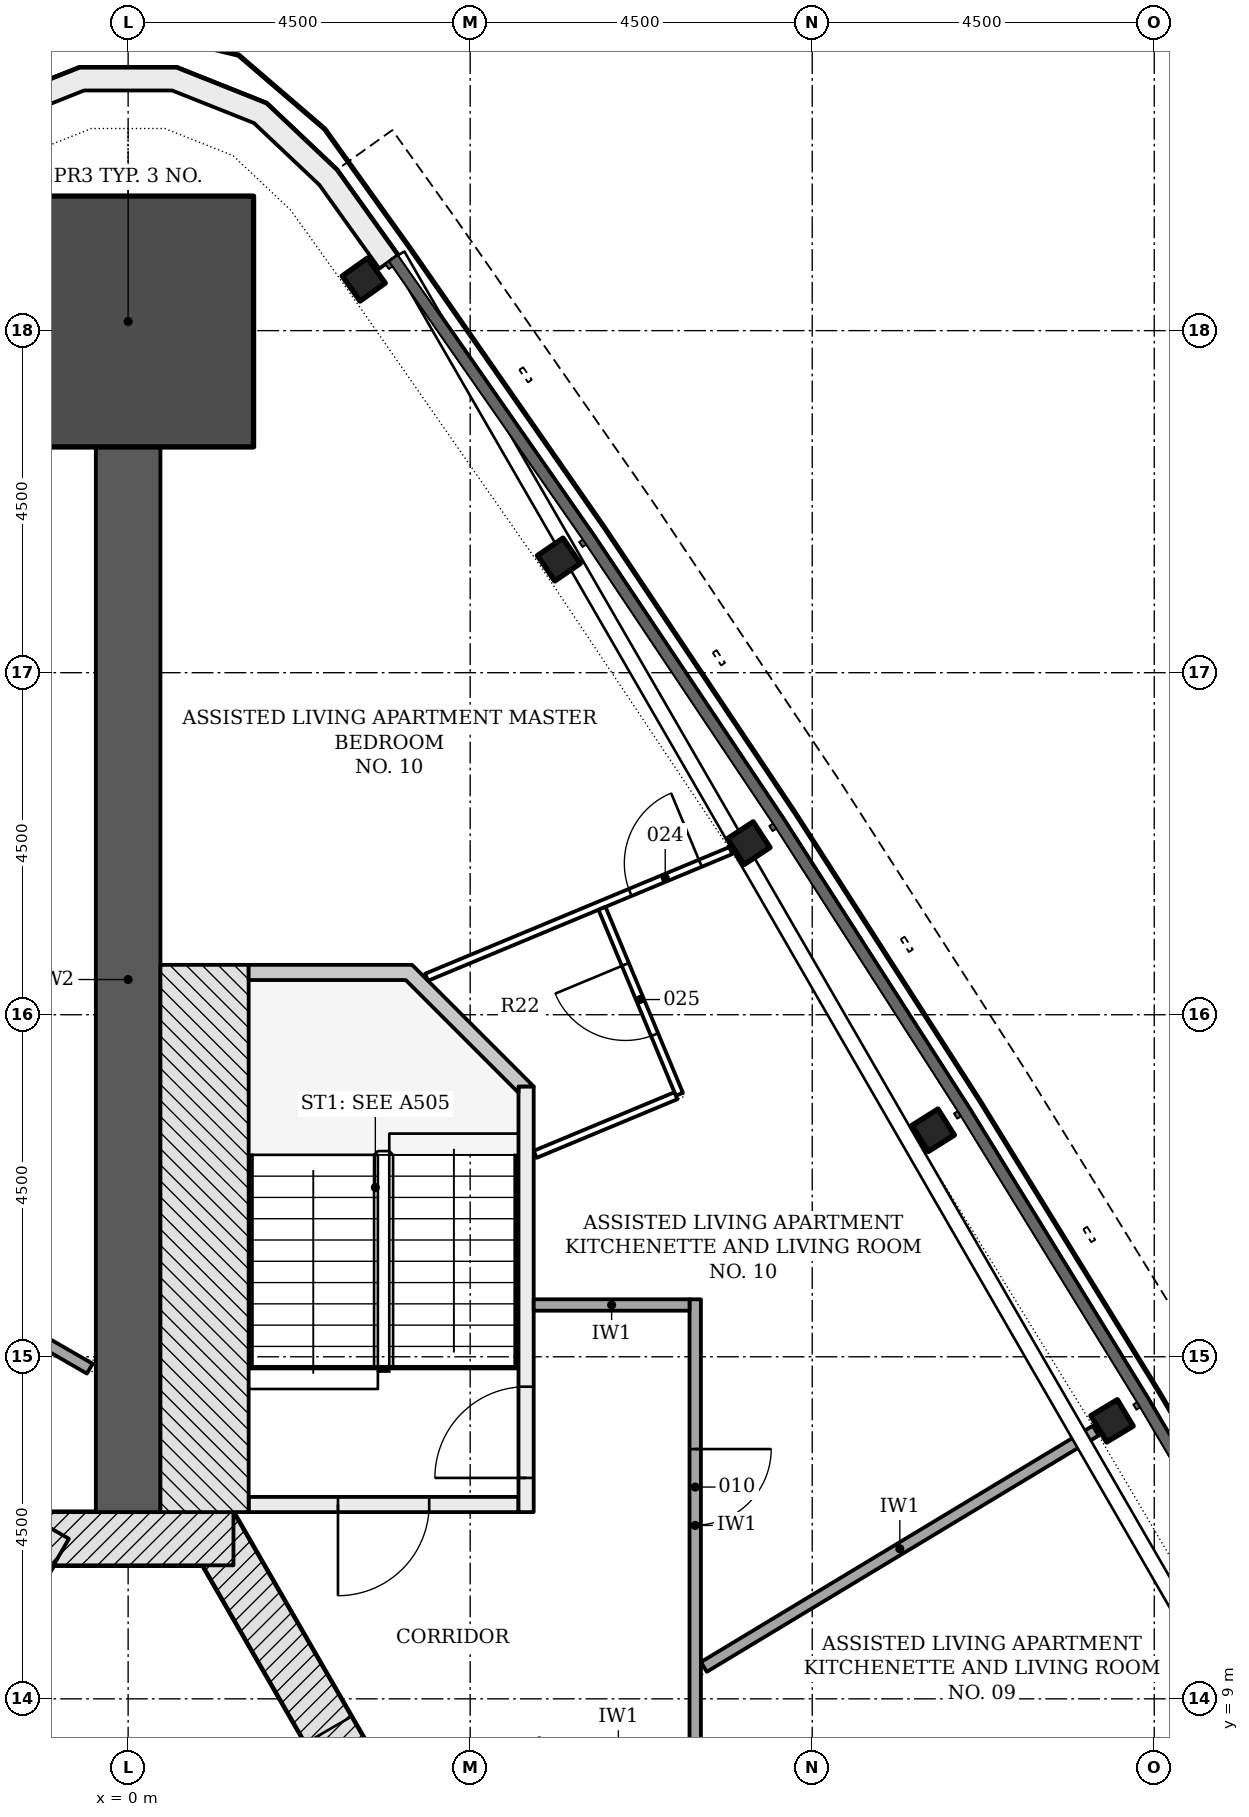
"""IFC4 building model, lengths in metres.
Left out: names, types, materials, properties, quantities, classifications, styles, units other than length and angle.
Written with IfcOpenShell. Run it as: python <this file> out.ifc"""

import sys

from ifc_helpers import new_model, si_unit, direction, frame, frame_2d, origin, origin_2d, place, context, subcontext, project, spatial, polyline, rectangle, i_section, outline, extrude, element, fill, save


model = new_model("IFC4")
c1 = context("Model", 3, precision=1e-05, world=origin(), true_north=direction((0.0, 1.0)))
c2 = subcontext(c1, "Body", "Model", "MODEL_VIEW")
j1 = project(units=[si_unit("LENGTHUNIT", "METRE"), si_unit("PLANEANGLEUNIT", "RADIAN")], contexts=[c1])
p1 = place(None, origin())
s1 = spatial("IfcSite", under=j1, at=p1, CompositionType="ELEMENT")
p2 = place(p1, origin())
s2 = spatial("IfcBuilding", under=s1, at=p2, CompositionType="ELEMENT")
p3 = place(p2, frame((0.0, 0.0, 45.6)))
s3 = spatial("IfcBuildingStorey", under=s2, at=p3, CompositionType="ELEMENT", Elevation=45.6)
p4 = place(p3, frame((10.311, -4.703, -0.2), z_axis=(0.0, 0.0, 1.0), x_axis=(-0.500001446645, 0.866024568562, 0.0)))
e1 = element("IfcWall", 1, at=p4, inside=s3, PredefinedType="SHEAR", context=c2, shape_type="SweptSolid", body=[
    extrude(rectangle(XDim=18.458, YDim=0.7, at=frame_2d((9.229, 0.0))), origin(), (0.0, 0.0, 1.0), 3.6),
])
p5 = place(p4, frame((10.5, 0.0, 0.2)))
e2 = element("IfcOpeningElement", 2, at=p5, cuts=e1, PredefinedType="OPENING", context=c2, shape_type="SweptSolid", body=[
    extrude(rectangle(XDim=1.0, YDim=2.1, at=frame_2d((0.5, 1.05))), frame((0.0, 0.36, 0.0), z_axis=(0.0, -1.0, 0.0), x_axis=(1.0, 0.0, 0.0)), (0.0, 0.0, 1.0), 0.72),
])
p6 = place(p4, frame((4.877, 0.0, 0.2)))
e3 = element("IfcOpeningElement", 3, at=p6, cuts=e1, PredefinedType="OPENING", context=c2, shape_type="SweptSolid", body=[
    extrude(rectangle(XDim=0.9, YDim=2.1, at=frame_2d((0.45, 1.05))), frame((0.0, 0.36, 0.0), z_axis=(0.0, -1.0, 0.0), x_axis=(1.0, 0.0, 0.0)), (0.0, 0.0, 1.0), 0.72),
])
p7 = place(p4, frame((14.452, 0.0, 0.2)))
e4 = element("IfcOpeningElement", 4, at=p7, cuts=e1, PredefinedType="OPENING", context=c2, shape_type="SweptSolid", body=[
    extrude(rectangle(XDim=0.9, YDim=2.1, at=frame_2d((0.45, 1.05))), frame((0.0, 0.36, 0.0), z_axis=(0.0, -1.0, 0.0), x_axis=(1.0, 0.0, 0.0)), (0.0, 0.0, 1.0), 0.72),
])
p8 = place(p3, frame((1.386, 11.106, -0.2), z_axis=(0.0, 0.0, 1.0), x_axis=(-1.0, 0.0, 0.0)))
e5 = element("IfcWall", 5, at=p8, inside=s3, PredefinedType="SHEAR", context=c2, shape_type="SweptSolid", body=[
    extrude(rectangle(XDim=2.771, YDim=0.7, at=frame_2d((1.386, 0.0))), origin(), (0.0, 0.0, 1.0), 3.6),
])
p9 = place(p3, frame((-1.083, 11.281, -0.2), z_axis=(0.0, 0.0, 1.0), x_axis=(-0.500001446645, -0.866024568562, 0.0)))
e6 = element("IfcWall", 6, at=p9, inside=s3, PredefinedType="SHEAR", context=c2, shape_type="SweptSolid", body=[
    extrude(rectangle(XDim=18.458, YDim=0.7, at=frame_2d((9.229, 0.0))), origin(), (0.0, 0.0, 1.0), 3.6),
])
p10 = place(p9, frame((8.979, 0.0, 0.2)))
e7 = element("IfcOpeningElement", 7, at=p10, cuts=e6, PredefinedType="OPENING", context=c2, shape_type="SweptSolid", body=[
    extrude(rectangle(XDim=1.2, YDim=2.1, at=frame_2d((0.6, 1.05))), frame((0.0, 0.36, 0.0), z_axis=(0.0, -1.0, 0.0), x_axis=(1.0, 0.0, 0.0)), (0.0, 0.0, 1.0), 0.72),
])
p11 = place(p9, frame((11.029, 0.0, 0.2)))
e8 = element("IfcOpeningElement", 8, at=p11, cuts=e6, PredefinedType="OPENING", context=c2, shape_type="SweptSolid", body=[
    extrude(rectangle(XDim=1.2, YDim=2.1, at=frame_2d((0.6, 1.05))), frame((0.0, 0.36, 0.0), z_axis=(0.0, -1.0, 0.0), x_axis=(1.0, 0.0, 0.0)), (0.0, 0.0, 1.0), 0.72),
])
p12 = place(p3, frame((0.0, 11.456, -0.2), z_axis=(0.0, 0.0, 1.0), x_axis=(0.0, 1.0, 0.0)))
e9 = element("IfcWall", 9, at=p12, inside=s3, PredefinedType="SHEAR", context=c2, shape_type="SweptSolid", body=[
    extrude(rectangle(XDim=14.014, YDim=0.85, at=frame_2d((7.007, 0.0))), origin(), (0.0, 0.0, 1.0), 3.6),
])
p13 = place(p3, frame((0.0, 27.12, -0.2), z_axis=(0.0, 0.0, 1.0), x_axis=(0.0, 1.0, 0.0)))
e10 = element("IfcColumn", 10, at=p13, inside=s3, PredefinedType="COLUMN", context=c2, shape_type="SweptSolid", body=[
    extrude(rectangle(XDim=3.3, YDim=3.3, at=origin_2d()), origin(), (0.0, 0.0, 1.0), 3.6),
])
for number, where, z_axis, x_axis in (
    (11, (12.944, 12.657, -0.2), (0.0, 0.0, 1.0), (-0.516, 0.856, 0.0)),
    (12, (10.59, 16.48, -0.2), (0.0, 0.0, 1.0), (-0.532, 0.846, 0.0)),
    (13, (8.164, 20.258, -0.2), (0.0, 0.0, 1.0), (-0.548, 0.836, 0.0)),
    (14, (5.667, 23.989, -0.2), (0.0, 0.0, 1.0), (-0.564, 0.826, 0.0)),
    (15, (3.1, 27.672, -0.2), (0.0, 0.0, 1.0), (-0.58, 0.815, 0.0)),
):
    element("IfcColumn", number, at=place(p3, frame(where, z_axis=z_axis, x_axis=x_axis)), inside=s3, PredefinedType="COLUMN", context=c2, shape_type="SweptSolid", body=[
        extrude(i_section(OverallWidth=0.404, OverallDepth=0.406, WebThickness=0.027, FlangeThickness=0.044, FilletRadius=0.015, at=origin_2d()), origin(), (0.0, 0.0, 1.0), 3.6),
    ])
p14 = place(p3, origin())
e16 = element("IfcWall", 16, at=p14, inside=s3, PredefinedType="NOTDEFINED", context=c2, shape_type="SweptSolid", body=[
    extrude(outline(polyline([(3.548, 27.99), (2.744, 29.114), (1.819, 29.989), (0.636, 30.459), (-0.636, 30.459), (-1.819, 29.989), (-2.744, 29.114), (-3.548, 27.99), (-3.304, 27.816), (-2.517, 28.916), (-1.655, 29.731), (-0.579, 30.159), (0.579, 30.159), (1.655, 29.731), (2.517, 28.916), (3.304, 27.816), (3.548, 27.99)])), origin(), (0.0, 0.0, 1.0), 3.3),
])
p15 = place(p3, frame((5.135, 11.556, -0.2), z_axis=(0.0, 0.0, 1.0), x_axis=(-1.0, 0.0, 0.0)))
e17 = element("IfcWall", 17, at=p15, inside=s3, PredefinedType="SHEAR", context=c2, shape_type="SweptSolid", body=[
    extrude(rectangle(XDim=3.55, YDim=0.2, at=frame_2d((1.775, 0.0))), origin(), (0.0, 0.0, 1.0), 3.6),
])
p16 = place(p15, frame((1.175, 0.0, 0.2)))
e18 = element("IfcOpeningElement", 18, at=p16, cuts=e17, PredefinedType="OPENING", context=c2, shape_type="SweptSolid", body=[
    extrude(rectangle(XDim=1.2, YDim=2.1, at=frame_2d((0.6, 1.05))), frame((0.0, 0.11, 0.0), z_axis=(0.0, -1.0, 0.0), x_axis=(1.0, 0.0, 0.0)), (0.0, 0.0, 1.0), 0.22),
])
p17 = place(p3, frame((5.236, 11.456, -0.2), z_axis=(0.0, 0.0, 1.0), x_axis=(0.0, 1.0, 0.0)))
e19 = element("IfcWall", 19, at=p17, inside=s3, PredefinedType="SHEAR", context=c2, shape_type="SweptSolid", body=[
    extrude(rectangle(XDim=5.6, YDim=0.2, at=frame_2d((2.8, 0.0))), origin(), (0.0, 0.0, 1.0), 3.6),
])
p18 = place(p17, frame((0.45, 0.0, 0.2)))
e20 = element("IfcOpeningElement", 20, at=p18, cuts=e19, PredefinedType="OPENING", context=c2, shape_type="SweptSolid", body=[
    extrude(rectangle(XDim=1.2, YDim=2.1, at=frame_2d((0.6, 1.05))), frame((0.0, 0.11, 0.0), z_axis=(0.0, -1.0, 0.0), x_axis=(1.0, 0.0, 0.0)), (0.0, 0.0, 1.0), 0.22),
])
p19 = place(p3, frame((1.005, 11.456, -0.2), z_axis=(0.0, 0.0, 1.0), x_axis=(0.0, 1.0, 0.0)))
e21 = element("IfcWall", 21, at=p19, inside=s3, PredefinedType="SHEAR", context=c2, shape_type="SweptSolid", body=[
    extrude(rectangle(XDim=7.2, YDim=1.161, at=frame_2d((3.6, 0.0))), origin(), (0.0, 0.0, 1.0), 3.6),
])
p20 = place(p3, frame((0.0, 0.0, -0.2)))
e22 = element("IfcWall", 22, at=p20, inside=s3, PredefinedType="SHEAR", context=c2, shape_type="SweptSolid", body=[
    extrude(outline(polyline([(5.336, 17.056), (3.736, 18.656), (1.586, 18.656), (1.586, 18.456), (3.653, 18.456), (5.135, 16.974), (5.135, 17.056), (5.135, 17.056), (5.135, 17.056), (5.135, 17.056), (5.135, 17.056), (5.135, 17.056), (5.135, 17.056), (5.135, 17.056), (5.135, 17.056), (5.135, 17.056), (5.135, 17.056), (5.135, 17.056), (5.135, 17.056), (5.135, 17.056), (5.135, 17.056), (5.135, 17.056), (5.135, 17.056), (5.336, 17.056)])), origin(), (0.0, 0.0, 1.0), 3.6),
])
p21 = place(p3, frame((7.461, 14.256, 0.0), z_axis=(0.0, 0.0, 1.0), x_axis=(0.0, -1.0, 0.0)))
e23 = element("IfcWall", 23, at=p21, inside=s3, PredefinedType="PARTITIONING", context=c2, shape_type="SweptSolid", body=[
    extrude(rectangle(XDim=5.95, YDim=0.15, at=frame_2d((2.975, 0.0))), origin(), (0.0, 0.0, 1.0), 2.778),
])
p22 = place(p21, frame((1.97, 0.0, 0.0)))
e24 = element("IfcOpeningElement", 24, at=p22, cuts=e23, PredefinedType="OPENING", context=c2, shape_type="SweptSolid", body=[
    extrude(rectangle(XDim=1.0, YDim=2.1, at=frame_2d((0.5, 1.05))), frame((0.0, 0.085, 0.0), z_axis=(0.0, -1.0, 0.0), x_axis=(1.0, 0.0, 0.0)), (0.0, 0.0, 1.0), 0.17),
])
p23 = place(p3, frame((-5.111, 16.003, 0.0), z_axis=(0.0, 0.0, 1.0), x_axis=(0.866034245675, -0.499984685083, 0.0)))
e25 = element("IfcWall", 25, at=p23, inside=s3, PredefinedType="PARTITIONING", context=c2, shape_type="SweptSolid", body=[
    extrude(rectangle(XDim=5.319, YDim=0.15, at=frame_2d((2.66, 0.0))), origin(), (0.0, 0.0, 1.0), 3.4),
])
p24 = place(p23, frame((1.834, 0.0, 0.0)))
e26 = element("IfcOpeningElement", 26, at=p24, cuts=e25, PredefinedType="OPENING", context=c2, shape_type="SweptSolid", body=[
    extrude(rectangle(XDim=1.5, YDim=2.1, at=frame_2d((0.75, 1.05))), frame((0.0, 0.085, 0.0), z_axis=(0.0, -1.0, 0.0), x_axis=(1.0, 0.0, 0.0)), (0.0, 0.0, 1.0), 0.17),
])
p25 = place(p3, frame((5.336, 14.181, 0.0), z_axis=(0.0, 0.0, 1.0), x_axis=(1.0, 0.0, 0.0)))
e27 = element("IfcWall", 27, at=p25, inside=s3, PredefinedType="PARTITIONING", context=c2, shape_type="SweptSolid", body=[
    extrude(rectangle(XDim=2.05, YDim=0.15, at=frame_2d((1.025, 0.0))), origin(), (0.0, 0.0, 1.0), 2.923),
])
p26 = place(p3, frame((12.73, 12.528, 0.0), z_axis=(0.0, 0.0, 1.0), x_axis=(-0.856413986998, -0.516289727648, 0.0)))
e28 = element("IfcWall", 28, at=p26, inside=s3, PredefinedType="PARTITIONING", context=c2, shape_type="SweptSolid", body=[
    extrude(rectangle(XDim=6.02, YDim=0.15, at=frame_2d((3.01, 0.0))), origin(), (0.0, 0.0, 1.0), 2.778),
])
p27 = place(p3, frame((15.002, 8.677, 0.0), z_axis=(0.0, 0.0, 1.0), x_axis=(-0.866019139798, -0.500010849386, 0.0)))
e29 = element("IfcWall", 29, at=p27, inside=s3, PredefinedType="PARTITIONING", context=c2, shape_type="SweptSolid", body=[
    extrude(rectangle(XDim=8.403, YDim=0.1, at=frame_2d((4.201, 0.0))), origin(), (0.0, 0.0, 1.0), 2.778),
])
p28 = place(p27, frame((6.603, 0.0, 0.0)))
e30 = element("IfcOpeningElement", 30, at=p28, cuts=e29, PredefinedType="OPENING", context=c2, shape_type="SweptSolid", body=[
    extrude(rectangle(XDim=1.0, YDim=2.1, at=frame_2d((0.5, 1.05))), frame((0.0, 0.06, 0.0), z_axis=(0.0, -1.0, 0.0), x_axis=(1.0, 0.0, 0.0)), (0.0, 0.0, 1.0), 0.12),
])
p29 = place(p27, frame((1.9, 0.0, 0.0)))
e31 = element("IfcOpeningElement", 31, at=p29, cuts=e29, PredefinedType="OPENING", context=c2, shape_type="SweptSolid", body=[
    extrude(rectangle(XDim=1.0, YDim=2.1, at=frame_2d((0.5, 1.05))), frame((0.0, 0.06, 0.0), z_axis=(0.0, -1.0, 0.0), x_axis=(1.0, 0.0, 0.0)), (0.0, 0.0, 1.0), 0.12),
])
p30 = place(p3, frame((3.926, 18.493, 0.0), z_axis=(0.0, 0.0, 1.0), x_axis=(0.923190161015, 0.384343500798, 0.0)))
e32 = element("IfcWall", 32, at=p30, inside=s3, PredefinedType="PARTITIONING", context=c2, shape_type="SweptSolid", body=[
    extrude(rectangle(XDim=4.336, YDim=0.1, at=frame_2d((2.168, 0.0))), origin(), (0.0, 0.0, 1.0), 2.923),
])
p31 = place(p30, frame((2.902, 0.0, 0.0)))
e33 = element("IfcOpeningElement", 33, at=p31, cuts=e32, PredefinedType="OPENING", context=c2, shape_type="SweptSolid", body=[
    extrude(rectangle(XDim=1.0, YDim=2.1, at=frame_2d((0.5, 1.05))), frame((0.0, 0.06, 0.0), z_axis=(0.0, -1.0, 0.0), x_axis=(1.0, 0.0, 0.0)), (0.0, 0.0, 1.0), 0.12),
])
p32 = place(p3, frame((7.253, 16.954, 0.0), z_axis=(0.0, 0.0, 1.0), x_axis=(-0.38437985992, 0.923175023107, 0.0)))
e34 = element("IfcWall", 34, at=p32, inside=s3, PredefinedType="PARTITIONING", context=c2, shape_type="SweptSolid", body=[
    extrude(rectangle(XDim=2.65, YDim=0.1, at=frame_2d((1.325, 0.0))), origin(), (0.0, 0.0, 1.0), 2.923),
])
p33 = place(p32, frame((0.85, 0.0, 0.0)))
e35 = element("IfcOpeningElement", 35, at=p33, cuts=e34, PredefinedType="OPENING", context=c2, shape_type="SweptSolid", body=[
    extrude(rectangle(XDim=1.0, YDim=2.1, at=frame_2d((0.5, 1.05))), frame((0.0, 0.06, 0.0), z_axis=(0.0, -1.0, 0.0), x_axis=(1.0, 0.0, 0.0)), (0.0, 0.0, 1.0), 0.12),
])
p34 = place(p3, frame((5.355, 16.163, 0.0), z_axis=(0.0, 0.0, 1.0), x_axis=(0.923206524755, 0.38430419286, 0.0)))
e36 = element("IfcWall", 36, at=p34, inside=s3, PredefinedType="PARTITIONING", context=c2, shape_type="SweptSolid", body=[
    extrude(rectangle(XDim=2.006, YDim=0.1, at=frame_2d((1.003, 0.0))), origin(), (0.0, 0.0, 1.0), 3.4),
])
p35 = place(p7, origin())
e37 = element("IfcDoor", 37, at=p35, inside=s3, OperationType="SINGLE_SWING_LEFT", PredefinedType="DOOR", context=c2, shape_type="SweptSolid", body=[
    extrude(rectangle(XDim=0.9, YDim=2.1, at=frame_2d((0.45, 1.05))), frame((0.0, 0.075, 0.0), z_axis=(0.0, -1.0, 0.0), x_axis=(1.0, 0.0, 0.0)), (0.0, 0.0, 1.0), 0.15),
])
fill(e4, e37)
p36 = place(p16, origin())
e38 = element("IfcDoor", 38, at=p36, inside=s3, OperationType="SINGLE_SWING_RIGHT", PredefinedType="DOOR", context=c2, shape_type="SweptSolid", body=[
    extrude(rectangle(XDim=1.2, YDim=2.1, at=frame_2d((0.6, 1.05))), frame((0.0, 0.025, 0.0), z_axis=(0.0, -1.0, 0.0), x_axis=(1.0, 0.0, 0.0)), (0.0, 0.0, 1.0), 0.05),
])
fill(e18, e38)
p37 = place(p18, origin())
e39 = element("IfcDoor", 39, at=p37, inside=s3, OperationType="SINGLE_SWING_LEFT", PredefinedType="DOOR", context=c2, shape_type="SweptSolid", body=[
    extrude(rectangle(XDim=1.2, YDim=2.1, at=frame_2d((0.6, 1.05))), frame((0.0, 0.025, 0.0), z_axis=(0.0, -1.0, 0.0), x_axis=(1.0, 0.0, 0.0)), (0.0, 0.0, 1.0), 0.05),
])
fill(e20, e39)
p38 = place(p22, origin())
e40 = element("IfcDoor", 40, at=p38, inside=s3, OperationType="SINGLE_SWING_LEFT", PredefinedType="DOOR", context=c2, shape_type="SweptSolid", body=[
    extrude(rectangle(XDim=1.0, YDim=2.1, at=frame_2d((0.5, 1.05))), frame((0.0, 0.025, 0.0), z_axis=(0.0, -1.0, 0.0), x_axis=(1.0, 0.0, 0.0)), (0.0, 0.0, 1.0), 0.05),
])
fill(e24, e40)
p39 = place(p31, origin())
e41 = element("IfcDoor", 41, at=p39, inside=s3, OperationType="SINGLE_SWING_RIGHT", PredefinedType="DOOR", context=c2, shape_type="SweptSolid", body=[
    extrude(rectangle(XDim=1.0, YDim=2.1, at=frame_2d((0.5, 1.05))), frame((0.0, 0.025, 0.0), z_axis=(0.0, -1.0, 0.0), x_axis=(1.0, 0.0, 0.0)), (0.0, 0.0, 1.0), 0.05),
])
fill(e33, e41)
p40 = place(p33, origin())
e42 = element("IfcDoor", 42, at=p40, inside=s3, OperationType="SINGLE_SWING_RIGHT", PredefinedType="DOOR", context=c2, shape_type="SweptSolid", body=[
    extrude(rectangle(XDim=1.0, YDim=2.1, at=frame_2d((0.5, 1.05))), frame((0.0, 0.025, 0.0), z_axis=(0.0, -1.0, 0.0), x_axis=(1.0, 0.0, 0.0)), (0.0, 0.0, 1.0), 0.05),
])
fill(e35, e42)
save(model, sys.argv[1])
